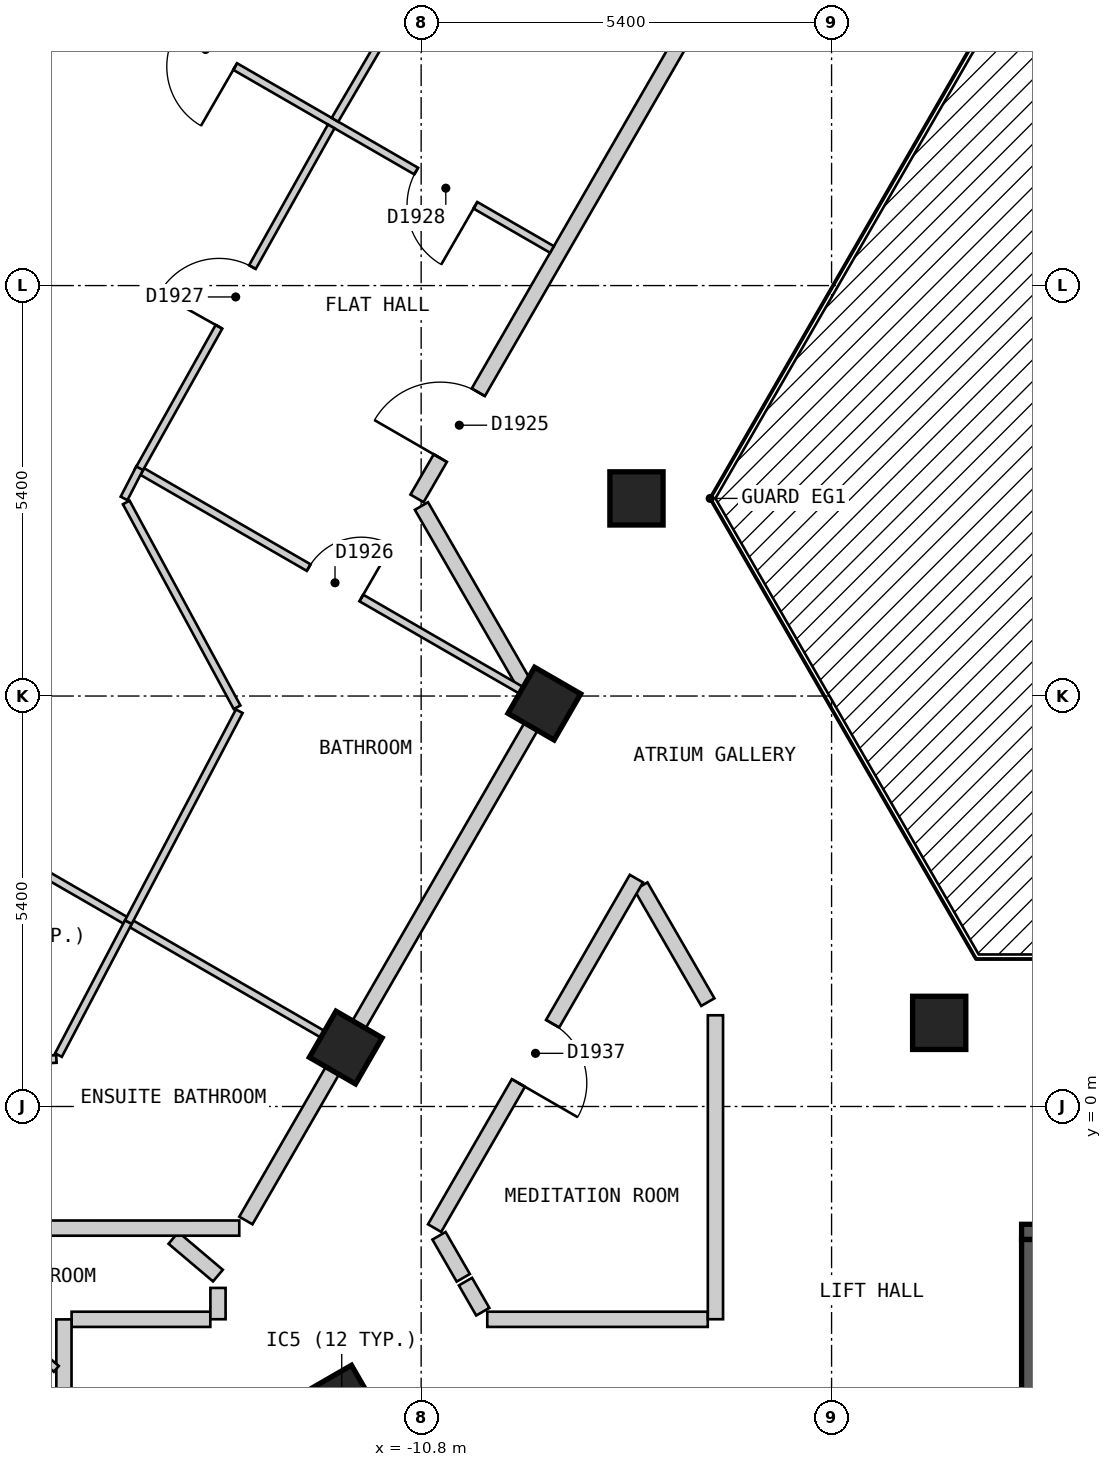
"""IFC4 building model, lengths in metres.
Left out: names, types, materials, properties, quantities, classifications, styles, units other than length and angle.
Written with IfcOpenShell. Run it as: python <this file> out.ifc"""

import sys

from ifc_helpers import new_model, si_unit, direction, frame, frame_2d, origin, origin_2d, place, context, subcontext, project, spatial, polyline, rectangle, outline, extrude, element, fill, save


model = new_model("IFC4")
c1 = context("Model", 3, precision=1e-05, world=origin(), true_north=direction((0.0, 1.0)))
c2 = subcontext(c1, "Body", "Model", "MODEL_VIEW")
j1 = project(units=[si_unit("LENGTHUNIT", "METRE"), si_unit("PLANEANGLEUNIT", "RADIAN")], contexts=[c1])
p1 = place(None, origin())
s1 = spatial("IfcSite", under=j1, at=p1, CompositionType="ELEMENT")
p2 = place(p1, origin())
s2 = spatial("IfcBuilding", under=s1, at=p2, CompositionType="ELEMENT")
p3 = place(p2, frame((0.0, 0.0, 220.8)))
s3 = spatial("IfcBuildingStorey", under=s2, at=p3, CompositionType="ELEMENT", Elevation=220.8)
for number, where, z_axis, x_axis in (
    (1, (-11.845, -3.883, 0.0), (0.0, 0.0, 1.0), (0.5, -0.866, 0.0)),
    (2, (-7.967, 8.0, 0.0), (0.0, 0.0, 1.0), (1.0, 0.0, 0.0)),
    (3, (-9.179, 5.3, 0.0), (0.0, 0.0, 1.0), (-0.5, -0.866, 0.0)),
    (4, (-3.984, 1.1, 0.0), (0.0, 0.0, 1.0), (1.0, 0.0, 0.0)),
    (5, (-11.792, 0.775, 0.0), (0.0, 0.0, 1.0), (-0.5, -0.866, 0.0)),
):
    element("IfcColumn", number, at=place(p3, frame(where, z_axis=z_axis, x_axis=x_axis)), inside=s3, PredefinedType="COLUMN", context=c2, shape_type="SweptSolid", body=[
        extrude(rectangle(XDim=0.7, YDim=0.7, at=origin_2d()), origin(), (0.0, 0.0, 1.0), 3.0),
    ])
p4 = place(p3, frame((-12.514, 20.025, 0.0), z_axis=(0.0, 0.0, 1.0), x_axis=(-0.500003656944, -0.866023292436, 0.0)))
e6 = element("IfcWall", 6, at=p4, inside=s3, PredefinedType="SOLIDWALL", context=c2, shape_type="SweptSolid", body=[
    extrude(outline(polyline([(0.0, -0.15), (22.17, -0.15), (22.09, 0.15), (0.08, 0.15), (0.0, -0.15)])), origin(), (0.0, 0.0, 1.0), 2.7),
])
p5 = place(p4, frame((1.191, 0.0, 0.15)))
e7 = element("IfcOpeningElement", 7, at=p5, cuts=e6, PredefinedType="OPENING", context=c2, shape_type="SweptSolid", body=[
    extrude(rectangle(XDim=1.5, YDim=2.1, at=frame_2d((0.75, 1.05))), frame((0.0, 0.16, 0.0), z_axis=(0.0, -1.0, 0.0), x_axis=(1.0, 0.0, 0.0)), (0.0, 0.0, 1.0), 0.32),
])
p6 = place(p4, frame((3.804, 0.0, 0.15)))
e8 = element("IfcOpeningElement", 8, at=p6, cuts=e6, PredefinedType="OPENING", context=c2, shape_type="SweptSolid", body=[
    extrude(rectangle(XDim=1.5, YDim=2.1, at=frame_2d((0.75, 1.05))), frame((0.0, 0.16, 0.0), z_axis=(0.0, -1.0, 0.0), x_axis=(1.0, 0.0, 0.0)), (0.0, 0.0, 1.0), 0.32),
])
p7 = place(p4, frame((6.416, 0.0, 0.15)))
e9 = element("IfcOpeningElement", 9, at=p7, cuts=e6, PredefinedType="OPENING", context=c2, shape_type="SweptSolid", body=[
    extrude(rectangle(XDim=1.5, YDim=2.1, at=frame_2d((0.75, 1.05))), frame((0.0, 0.16, 0.0), z_axis=(0.0, -1.0, 0.0), x_axis=(1.0, 0.0, 0.0)), (0.0, 0.0, 1.0), 0.32),
])
p8 = place(p4, frame((9.029, 0.0, 0.15)))
e10 = element("IfcOpeningElement", 10, at=p8, cuts=e6, PredefinedType="OPENING", context=c2, shape_type="SweptSolid", body=[
    extrude(rectangle(XDim=1.5, YDim=2.1, at=frame_2d((0.75, 1.05))), frame((0.0, 0.16, 0.0), z_axis=(0.0, -1.0, 0.0), x_axis=(1.0, 0.0, 0.0)), (0.0, 0.0, 1.0), 0.32),
])
p9 = place(p4, frame((11.641, 0.0, 0.15)))
e11 = element("IfcOpeningElement", 11, at=p9, cuts=e6, PredefinedType="OPENING", context=c2, shape_type="SweptSolid", body=[
    extrude(rectangle(XDim=1.5, YDim=2.1, at=frame_2d((0.75, 1.05))), frame((0.0, 0.16, 0.0), z_axis=(0.0, -1.0, 0.0), x_axis=(1.0, 0.0, 0.0)), (0.0, 0.0, 1.0), 0.32),
])
p10 = place(p4, frame((14.254, 0.0, 0.15)))
e12 = element("IfcOpeningElement", 12, at=p10, cuts=e6, PredefinedType="OPENING", context=c2, shape_type="SweptSolid", body=[
    extrude(rectangle(XDim=1.5, YDim=2.1, at=frame_2d((0.75, 1.05))), frame((0.0, 0.16, 0.0), z_axis=(0.0, -1.0, 0.0), x_axis=(1.0, 0.0, 0.0)), (0.0, 0.0, 1.0), 0.32),
])
p11 = place(p4, frame((16.866, 0.0, 0.15)))
e13 = element("IfcOpeningElement", 13, at=p11, cuts=e6, PredefinedType="OPENING", context=c2, shape_type="SweptSolid", body=[
    extrude(rectangle(XDim=1.5, YDim=2.1, at=frame_2d((0.75, 1.05))), frame((0.0, 0.16, 0.0), z_axis=(0.0, -1.0, 0.0), x_axis=(1.0, 0.0, 0.0)), (0.0, 0.0, 1.0), 0.32),
])
p12 = place(p4, frame((19.479, 0.0, 0.15)))
e14 = element("IfcOpeningElement", 14, at=p12, cuts=e6, PredefinedType="OPENING", context=c2, shape_type="SweptSolid", body=[
    extrude(rectangle(XDim=1.5, YDim=2.1, at=frame_2d((0.75, 1.05))), frame((0.0, 0.16, 0.0), z_axis=(0.0, -1.0, 0.0), x_axis=(1.0, 0.0, 0.0)), (0.0, 0.0, 1.0), 0.32),
])
p13 = place(p3, frame((-2.9, -1.65, 0.0), z_axis=(0.0, 0.0, 1.0), x_axis=(1.0, 0.0, 0.0)))
e15 = element("IfcWall", 15, at=p13, inside=s3, PredefinedType="SOLIDWALL", context=c2, shape_type="SweptSolid", body=[
    extrude(rectangle(XDim=5.8, YDim=0.2, at=frame_2d((2.9, 0.0))), origin(), (0.0, 0.0, 1.0), 2.7),
])
p14 = place(p13, frame((0.3, 0.0, 0.0)))
e16 = element("IfcOpeningElement", 16, at=p14, cuts=e15, PredefinedType="OPENING", context=c2, shape_type="SweptSolid", body=[
    extrude(rectangle(XDim=1.2, YDim=2.1, at=frame_2d((0.6, 1.05))), frame((0.0, 0.11, 0.0), z_axis=(0.0, -1.0, 0.0), x_axis=(1.0, 0.0, 0.0)), (0.0, 0.0, 1.0), 0.22),
])
p15 = place(p3, frame((-2.8, -4.5, 0.0), z_axis=(0.0, 0.0, 1.0), x_axis=(0.0, 1.0, 0.0)))
e17 = element("IfcWall", 17, at=p15, inside=s3, PredefinedType="SOLIDWALL", context=c2, shape_type="SweptSolid", body=[
    extrude(rectangle(XDim=2.75, YDim=0.2, at=frame_2d((1.375, 0.0))), origin(), (0.0, 0.0, 1.0), 2.7),
])
p16 = place(p3, frame((-10.796, 7.9, 0.0), z_axis=(0.0, 0.0, 1.0), x_axis=(0.499674397761, -0.866213308731, 0.0)))
e18 = element("IfcWall", 18, at=p16, inside=s3, PredefinedType="PARTITIONING", context=c2, shape_type="SweptSolid", body=[
    extrude(rectangle(XDim=2.785, YDim=0.2, at=frame_2d((1.393, 0.0))), origin(), (0.0, 0.0, 1.0), 2.7),
])
p17 = place(p3, frame((-7.909, 2.898, 0.0), z_axis=(0.0, 0.0, 1.0), x_axis=(0.50019444547, -0.865913111531, 0.0)))
e19 = element("IfcWall", 19, at=p17, inside=s3, PredefinedType="PARTITIONING", context=c2, shape_type="SweptSolid", body=[
    extrude(rectangle(XDim=1.761, YDim=0.2, at=frame_2d((0.88, 0.0))), origin(), (0.0, 0.0, 1.0), 2.7),
])
p18 = place(p3, frame((-10.565, -1.701, 0.0), z_axis=(0.0, 0.0, 1.0), x_axis=(0.499512735409, -0.866306543416, 0.0)))
e20 = element("IfcWall", 20, at=p18, inside=s3, PredefinedType="PARTITIONING", context=c2, shape_type="SweptSolid", body=[
    extrude(rectangle(XDim=0.638, YDim=0.2, at=frame_2d((0.319, 0.0))), origin(), (0.0, 0.0, 1.0), 2.7),
])
p19 = place(p3, frame((-10.217, -2.304, 0.0), z_axis=(0.0, 0.0, 1.0), x_axis=(0.499013081552, -0.866594452117, 0.0)))
e21 = element("IfcWall", 21, at=p19, inside=s3, PredefinedType="PARTITIONING", context=c2, shape_type="SweptSolid", body=[
    extrude(rectangle(XDim=0.457, YDim=0.2, at=frame_2d((0.229, 0.0))), origin(), (0.0, 0.0, 1.0), 2.7),
])
p20 = place(p3, frame((-15.399, -2.8, 0.0), z_axis=(0.0, 0.0, 1.0), x_axis=(1.0, 0.0, 0.0)))
e22 = element("IfcWall", 22, at=p20, inside=s3, PredefinedType="PARTITIONING", context=c2, shape_type="SweptSolid", body=[
    extrude(rectangle(XDim=1.825, YDim=0.2, at=frame_2d((0.913, 0.0))), origin(), (0.0, 0.0, 1.0), 2.7),
])
p21 = place(p3, frame((-9.93, -2.8, 0.0), z_axis=(0.0, 0.0, 1.0), x_axis=(1.0, 0.0, 0.0)))
e23 = element("IfcWall", 23, at=p21, inside=s3, PredefinedType="PARTITIONING", context=c2, shape_type="SweptSolid", body=[
    extrude(rectangle(XDim=2.901, YDim=0.2, at=frame_2d((1.45, 0.0))), origin(), (0.0, 0.0, 1.0), 2.7),
])
p22 = place(p3, frame((-10.623, -1.6, 0.0), z_axis=(0.0, 0.0, 1.0), x_axis=(0.500040865889, 0.866001808567, 0.0)))
e24 = element("IfcWall", 24, at=p22, inside=s3, PredefinedType="PARTITIONING", context=c2, shape_type="SweptSolid", body=[
    extrude(rectangle(XDim=5.31, YDim=0.2, at=frame_2d((2.655, 0.0))), origin(), (0.0, 0.0, 1.0), 2.7),
])
p23 = place(p22, frame((2.205, 0.0, 0.0)))
e25 = element("IfcOpeningElement", 25, at=p23, cuts=e24, PredefinedType="OPENING", context=c2, shape_type="SweptSolid", body=[
    extrude(rectangle(XDim=0.9, YDim=2.1, at=frame_2d((0.45, 1.05))), frame((0.0, 0.11, 0.0), z_axis=(0.0, -1.0, 0.0), x_axis=(1.0, 0.0, 0.0)), (0.0, 0.0, 1.0), 0.22),
])
p24 = place(p3, frame((-13.106, -1.5, 0.0), z_axis=(0.0, 0.0, 1.0), x_axis=(0.500025705601, 0.86601056214, 0.0)))
e26 = element("IfcWall", 26, at=p24, inside=s3, PredefinedType="PARTITIONING", context=c2, shape_type="SweptSolid", body=[
    extrude(rectangle(XDim=7.735, YDim=0.2, at=frame_2d((3.868, 0.0))), origin(), (0.0, 0.0, 1.0), 2.7),
])
p25 = place(p3, frame((-10.854, 8.0, 0.0), z_axis=(0.0, 0.0, 1.0), x_axis=(0.499997637144, 0.866026767976, 0.0)))
e27 = element("IfcWall", 27, at=p25, inside=s3, PredefinedType="PARTITIONING", context=c2, shape_type="SweptSolid", body=[
    extrude(rectangle(XDim=10.854, YDim=0.2, at=frame_2d((5.427, 0.0))), origin(), (0.0, 0.0, 1.0), 2.7),
])
p26 = place(p25, frame((0.612, 0.0, 0.0)))
e28 = element("IfcOpeningElement", 28, at=p26, cuts=e27, PredefinedType="OPENING", context=c2, shape_type="SweptSolid", body=[
    extrude(rectangle(XDim=1.0, YDim=2.1, at=frame_2d((0.5, 1.05))), frame((0.0, 0.11, 0.0), z_axis=(0.0, -1.0, 0.0), x_axis=(1.0, 0.0, 0.0)), (0.0, 0.0, 1.0), 0.22),
])
p27 = place(p3, frame((-6.928, -2.799, 0.0), z_axis=(0.0, 0.0, 1.0), x_axis=(0.0, 1.0, 0.0)))
e29 = element("IfcWall", 29, at=p27, inside=s3, PredefinedType="PARTITIONING", context=c2, shape_type="SweptSolid", body=[
    extrude(rectangle(XDim=3.999, YDim=0.2, at=frame_2d((2.0, 0.0))), origin(), (0.0, 0.0, 1.0), 2.7),
])
p28 = place(p3, frame((-13.473, -2.799, 0.0), z_axis=(0.0, 0.0, 1.0), x_axis=(0.0, 1.0, 0.0)))
e30 = element("IfcWall", 30, at=p28, inside=s3, PredefinedType="PARTITIONING", context=c2, shape_type="SweptSolid", body=[
    extrude(rectangle(XDim=0.412, YDim=0.2, at=frame_2d((0.206, 0.0))), origin(), (0.0, 0.0, 1.0), 2.7),
])
p29 = place(p3, frame((-15.5, -6.599, 0.0), z_axis=(0.0, 0.0, 1.0), x_axis=(0.0, 1.0, 0.0)))
e31 = element("IfcWall", 31, at=p29, inside=s3, PredefinedType="PARTITIONING", context=c2, shape_type="SweptSolid", body=[
    extrude(rectangle(XDim=3.798, YDim=0.2, at=frame_2d((1.899, 0.0))), origin(), (0.0, 0.0, 1.0), 2.7),
])
p30 = place(p29, frame((1.291, 0.0, 0.0)))
e32 = element("IfcOpeningElement", 32, at=p30, cuts=e31, PredefinedType="OPENING", context=c2, shape_type="SweptSolid", body=[
    extrude(rectangle(XDim=1.0, YDim=2.1, at=frame_2d((0.5, 1.05))), frame((0.0, 0.11, 0.0), z_axis=(0.0, -1.0, 0.0), x_axis=(1.0, 0.0, 0.0)), (0.0, 0.0, 1.0), 0.22),
])
p31 = place(p3, frame((-14.68, 7.947, 0.0), z_axis=(0.0, 0.0, 1.0), x_axis=(0.475823637798, -0.879540712936, 0.0)))
e33 = element("IfcWall", 33, at=p31, inside=s3, PredefinedType="PARTITIONING", context=c2, shape_type="SweptSolid", body=[
    extrude(rectangle(XDim=3.064, YDim=0.1, at=frame_2d((1.532, 0.0))), origin(), (0.0, 0.0, 1.0), 2.7),
])
p32 = place(p3, frame((-20.539, 5.825, 0.0), z_axis=(0.0, 0.0, 1.0), x_axis=(0.866047370643, -0.499961950354, 0.0)))
e34 = element("IfcWall", 34, at=p32, inside=s3, PredefinedType="PARTITIONING", context=c2, shape_type="SweptSolid", body=[
    extrude(rectangle(XDim=10.001, YDim=0.1, at=frame_2d((5.0, 0.0))), origin(), (0.0, 0.0, 1.0), 2.7),
])
p33 = place(p32, frame((2.887, 0.0, 0.0)))
e35 = element("IfcOpeningElement", 35, at=p33, cuts=e34, PredefinedType="OPENING", context=c2, shape_type="SweptSolid", body=[
    extrude(rectangle(XDim=0.9, YDim=2.1, at=frame_2d((0.45, 1.05))), frame((0.0, 0.06, 0.0), z_axis=(0.0, -1.0, 0.0), x_axis=(1.0, 0.0, 0.0)), (0.0, 0.0, 1.0), 0.12),
])
p34 = place(p3, frame((-14.47, 8.354, 0.0), z_axis=(0.0, 0.0, 1.0), x_axis=(0.866067902578, -0.499926382705, 0.0)))
e36 = element("IfcWall", 36, at=p34, inside=s3, PredefinedType="PARTITIONING", context=c2, shape_type="SweptSolid", body=[
    extrude(rectangle(XDim=5.907, YDim=0.1, at=frame_2d((2.954, 0.0))), origin(), (0.0, 0.0, 1.0), 2.7),
])
p35 = place(p34, frame((2.529, 0.0, 0.0)))
e37 = element("IfcOpeningElement", 37, at=p35, cuts=e36, PredefinedType="OPENING", context=c2, shape_type="SweptSolid", body=[
    extrude(rectangle(XDim=0.8, YDim=2.1, at=frame_2d((0.4, 1.05))), frame((0.0, 0.06, 0.0), z_axis=(0.0, -1.0, 0.0), x_axis=(1.0, 0.0, 0.0)), (0.0, 0.0, 1.0), 0.12),
])
p36 = place(p3, frame((-15.314, 14.875, 0.0), z_axis=(0.0, 0.0, 1.0), x_axis=(0.866001485781, -0.500041424909, 0.0)))
e38 = element("IfcWall", 38, at=p36, inside=s3, PredefinedType="PARTITIONING", context=c2, shape_type="SweptSolid", body=[
    extrude(rectangle(XDim=7.2, YDim=0.1, at=frame_2d((3.6, 0.0))), origin(), (0.0, 0.0, 1.0), 2.7),
])
p37 = place(p36, frame((5.137, 0.0, 0.0)))
e39 = element("IfcOpeningElement", 39, at=p37, cuts=e38, PredefinedType="OPENING", context=c2, shape_type="SweptSolid", body=[
    extrude(rectangle(XDim=0.9, YDim=2.1, at=frame_2d((0.45, 1.05))), frame((0.0, 0.06, 0.0), z_axis=(0.0, -1.0, 0.0), x_axis=(1.0, 0.0, 0.0)), (0.0, 0.0, 1.0), 0.12),
])
p38 = place(p36, frame((1.487, 0.0, 0.0)))
e40 = element("IfcOpeningElement", 40, at=p38, cuts=e38, PredefinedType="OPENING", context=c2, shape_type="SweptSolid", body=[
    extrude(rectangle(XDim=0.9, YDim=2.1, at=frame_2d((0.45, 1.05))), frame((0.0, 0.06, 0.0), z_axis=(0.0, -1.0, 0.0), x_axis=(1.0, 0.0, 0.0)), (0.0, 0.0, 1.0), 0.12),
])
p39 = place(p3, frame((-17.38, -1.947, 0.0), z_axis=(0.0, 0.0, 1.0), x_axis=(0.763616683524, -0.645669854217, 0.0)))
e41 = element("IfcWall", 41, at=p39, inside=s3, PredefinedType="PARTITIONING", context=c2, shape_type="SweptSolid", body=[
    extrude(rectangle(XDim=2.331, YDim=0.1, at=frame_2d((1.166, 0.0))), origin(), (0.0, 0.0, 1.0), 2.7),
])
p40 = place(p39, frame((0.806, 0.0, 0.0)))
e42 = element("IfcOpeningElement", 42, at=p40, cuts=e41, PredefinedType="OPENING", context=c2, shape_type="SweptSolid", body=[
    extrude(rectangle(XDim=0.8, YDim=2.1, at=frame_2d((0.4, 1.05))), frame((0.0, 0.06, 0.0), z_axis=(0.0, -1.0, 0.0), x_axis=(1.0, 0.0, 0.0)), (0.0, 0.0, 1.0), 0.12),
])
p41 = place(p3, frame((-18.659, -3.459, 0.0), z_axis=(0.0, 0.0, 1.0), x_axis=(0.763550385572, -0.64574825489, 0.0)))
e43 = element("IfcWall", 43, at=p41, inside=s3, PredefinedType="PARTITIONING", context=c2, shape_type="SweptSolid", body=[
    extrude(rectangle(XDim=4.006, YDim=0.1, at=frame_2d((2.003, 0.0))), origin(), (0.0, 0.0, 1.0), 2.7),
])
p42 = place(p41, frame((1.593, 0.0, 0.0)))
e44 = element("IfcOpeningElement", 44, at=p42, cuts=e43, PredefinedType="OPENING", context=c2, shape_type="SweptSolid", body=[
    extrude(rectangle(XDim=0.9, YDim=2.1, at=frame_2d((0.45, 1.05))), frame((0.0, 0.06, 0.0), z_axis=(0.0, -1.0, 0.0), x_axis=(1.0, 0.0, 0.0)), (0.0, 0.0, 1.0), 0.12),
])
p43 = place(p3, frame((-11.934, 12.981, 0.0), z_axis=(0.0, 0.0, 1.0), x_axis=(0.506072703404, 0.862490822484, 0.0)))
e45 = element("IfcWall", 45, at=p43, inside=s3, PredefinedType="PARTITIONING", context=c2, shape_type="SweptSolid", body=[
    extrude(rectangle(XDim=8.212, YDim=0.1, at=frame_2d((4.106, 0.0))), origin(), (0.0, 0.0, 1.0), 2.7),
])
p44 = place(p3, frame((-15.572, 0.676, 0.0), z_axis=(0.0, 0.0, 1.0), x_axis=(0.465298498919, 0.885153832339, 0.0)))
e46 = element("IfcWall", 46, at=p44, inside=s3, PredefinedType="PARTITIONING", context=c2, shape_type="SweptSolid", body=[
    extrude(rectangle(XDim=1.977, YDim=0.1, at=frame_2d((0.989, 0.0))), origin(), (0.0, 0.0, 1.0), 2.7),
])
p45 = place(p3, frame((-14.522, 8.362, 0.0), z_axis=(0.0, 0.0, 1.0), x_axis=(0.488772229601, 0.872411432508, 0.0)))
e47 = element("IfcWall", 47, at=p45, inside=s3, PredefinedType="PARTITIONING", context=c2, shape_type="SweptSolid", body=[
    extrude(rectangle(XDim=5.195, YDim=0.1, at=frame_2d((2.597, 0.0))), origin(), (0.0, 0.0, 1.0), 2.7),
])
p46 = place(p45, frame((2.173, 0.0, 0.0)))
e48 = element("IfcOpeningElement", 48, at=p46, cuts=e47, PredefinedType="OPENING", context=c2, shape_type="SweptSolid", body=[
    extrude(rectangle(XDim=0.9, YDim=2.1, at=frame_2d((0.45, 1.05))), frame((0.0, 0.06, 0.0), z_axis=(0.0, -1.0, 0.0), x_axis=(1.0, 0.0, 0.0)), (0.0, 0.0, 1.0), 0.12),
])
p47 = place(p3, frame((-14.709, 8.0, 0.0), z_axis=(0.0, 0.0, 1.0), x_axis=(0.458976923864, 0.888448188337, 0.0)))
e49 = element("IfcWall", 49, at=p47, inside=s3, PredefinedType="PARTITIONING", context=c2, shape_type="SweptSolid", body=[
    extrude(rectangle(XDim=0.447, YDim=0.1, at=frame_2d((0.223, 0.0))), origin(), (0.0, 0.0, 1.0), 2.7),
])
p48 = place(p3, frame((-16.764, 0.568, 0.0), z_axis=(0.0, 0.0, 1.0), x_axis=(0.998809616198, 0.048778587419, 0.0)))
e50 = element("IfcWall", 50, at=p48, inside=s3, PredefinedType="PARTITIONING", context=c2, shape_type="SweptSolid", body=[
    extrude(rectangle(XDim=1.166, YDim=0.1, at=frame_2d((0.583, 0.0))), origin(), (0.0, 0.0, 1.0), 2.7),
])
p49 = place(p3, frame((-14.059, -1.73, 0.0), z_axis=(0.0, 0.0, 1.0), x_axis=(0.763289607824, -0.64605647941, 0.0)))
e51 = element("IfcWall", 51, at=p49, inside=s3, PredefinedType="PARTITIONING", context=c2, shape_type="SweptSolid", body=[
    extrude(rectangle(XDim=0.766, YDim=0.2, at=frame_2d((0.383, 0.0))), origin(), (0.0, 0.0, 1.0), 2.7),
])
p50 = place(p3, frame((-23.429, -1.601, 0.0), z_axis=(0.0, 0.0, 1.0), x_axis=(0.999999995449, 9.5406191e-05, 0.0)))
e52 = element("IfcWall", 52, at=p50, inside=s3, PredefinedType="PARTITIONING", context=c2, shape_type="SweptSolid", body=[
    extrude(rectangle(XDim=10.236, YDim=0.2, at=frame_2d((5.118, 0.0))), origin(), (0.0, 0.0, 1.0), 2.7),
])
p51 = place(p3, frame((-14.652, 2.426, 0.0), z_axis=(0.0, 0.0, 1.0), x_axis=(0.465502421984, 0.885046606189, 0.0)))
e53 = element("IfcWall", 53, at=p51, inside=s3, PredefinedType="PARTITIONING", context=c2, shape_type="SweptSolid", body=[
    extrude(rectangle(XDim=3.134, YDim=0.1, at=frame_2d((1.567, 0.0))), origin(), (0.0, 0.0, 1.0), 2.7),
])
p52 = place(p26, origin())
e54 = element("IfcDoor", 54, at=p52, inside=s3, OperationType="SINGLE_SWING_LEFT", PredefinedType="DOOR", context=c2, shape_type="SweptSolid", body=[
    extrude(rectangle(XDim=1.0, YDim=2.1, at=frame_2d((0.5, 1.05))), frame((0.0, 0.025, 0.0), z_axis=(0.0, -1.0, 0.0), x_axis=(1.0, 0.0, 0.0)), (0.0, 0.0, 1.0), 0.05),
])
fill(e28, e54)
p53 = place(p35, origin())
e55 = element("IfcDoor", 55, at=p53, inside=s3, OperationType="SINGLE_SWING_RIGHT", PredefinedType="DOOR", context=c2, shape_type="SweptSolid", body=[
    extrude(rectangle(XDim=0.8, YDim=2.1, at=frame_2d((0.4, 1.05))), frame((0.0, 0.025, 0.0), z_axis=(0.0, -1.0, 0.0), x_axis=(1.0, 0.0, 0.0)), (0.0, 0.0, 1.0), 0.05),
])
fill(e37, e55)
p54 = place(p46, origin())
e56 = element("IfcDoor", 56, at=p54, inside=s3, OperationType="SINGLE_SWING_LEFT", PredefinedType="DOOR", context=c2, shape_type="SweptSolid", body=[
    extrude(rectangle(XDim=0.9, YDim=2.1, at=frame_2d((0.45, 1.05))), frame((0.0, 0.025, 0.0), z_axis=(0.0, -1.0, 0.0), x_axis=(1.0, 0.0, 0.0)), (0.0, 0.0, 1.0), 0.05),
])
fill(e48, e56)
p55 = place(p37, origin())
e57 = element("IfcDoor", 57, at=p55, inside=s3, OperationType="SINGLE_SWING_RIGHT", PredefinedType="DOOR", context=c2, shape_type="SweptSolid", body=[
    extrude(rectangle(XDim=0.9, YDim=2.1, at=frame_2d((0.45, 1.05))), frame((0.0, 0.025, 0.0), z_axis=(0.0, -1.0, 0.0), x_axis=(1.0, 0.0, 0.0)), (0.0, 0.0, 1.0), 0.05),
])
fill(e39, e57)
p56 = place(p38, origin())
e58 = element("IfcDoor", 58, at=p56, inside=s3, OperationType="SINGLE_SWING_RIGHT", PredefinedType="DOOR", context=c2, shape_type="SweptSolid", body=[
    extrude(rectangle(XDim=0.9, YDim=2.1, at=frame_2d((0.45, 1.05))), frame((0.0, 0.025, 0.0), z_axis=(0.0, -1.0, 0.0), x_axis=(1.0, 0.0, 0.0)), (0.0, 0.0, 1.0), 0.05),
])
fill(e40, e58)
p57 = place(p23, origin())
e59 = element("IfcDoor", 59, at=p57, inside=s3, OperationType="SINGLE_SWING_LEFT", PredefinedType="DOOR", context=c2, shape_type="SweptSolid", body=[
    extrude(rectangle(XDim=0.9, YDim=2.1, at=frame_2d((0.45, 1.05))), frame((0.0, 0.025, 0.0), z_axis=(0.0, -1.0, 0.0), x_axis=(1.0, 0.0, 0.0)), (0.0, 0.0, 1.0), 0.05),
])
fill(e25, e59)
save(model, sys.argv[1])
